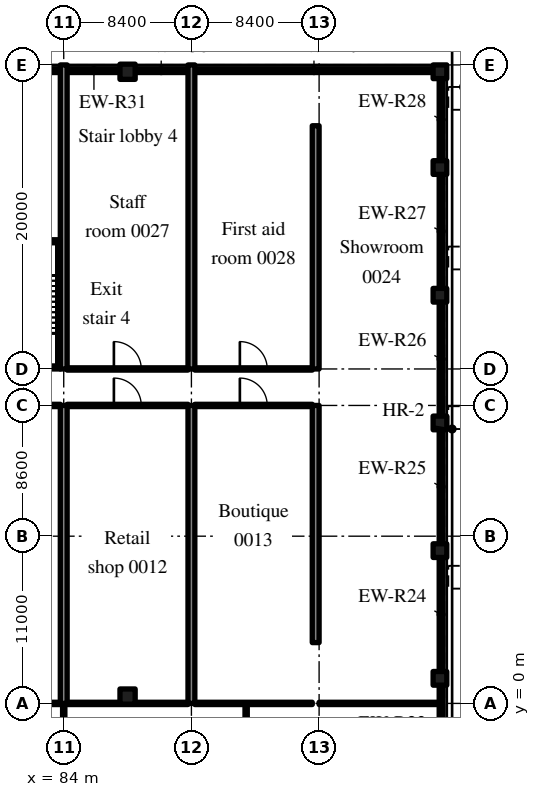
"""IFC4 building model, lengths in metres.
Left out: names, types, materials, properties, quantities, classifications, styles, units other than length and angle.
Written with IfcOpenShell. Run it as: python <this file> out.ifc"""

import sys

from ifc_helpers import new_model, si_unit, direction, frame, frame_2d, origin, origin_2d, place, context, subcontext, project, spatial, rectangle, extrude, source, transform, mapped, element, fill, save


model = new_model("IFC4")
c1 = context("Model", 3, precision=1e-05, world=origin(), true_north=direction((0.0, 1.0)))
c2 = subcontext(c1, "Body", "Model", "MODEL_VIEW")
j1 = project(units=[si_unit("LENGTHUNIT", "METRE"), si_unit("PLANEANGLEUNIT", "RADIAN")], contexts=[c1])
p1 = place(None, origin())
s1 = spatial("IfcSite", under=j1, at=p1, CompositionType="ELEMENT")
p2 = place(p1, origin())
s2 = spatial("IfcBuilding", under=s1, at=p2, CompositionType="ELEMENT")
p3 = place(p2, origin())
s3 = spatial("IfcBuildingStorey", under=s2, at=p3, CompositionType="ELEMENT", Elevation=0.0)
m1 = source(origin(), c2, "Body", "SweptSolid", [
    extrude(rectangle(XDim=19.6, YDim=0.45, at=frame_2d((9.8, 0.0))), origin(), (0.0, 0.0, 1.0), 5.72),
])
p4 = place(p3, frame((84.0, 0.0, 0.0), z_axis=(0.0, 0.0, 1.0), x_axis=(0.0, 1.0, 0.0)))
e1 = element("IfcWall", 1, at=p4, inside=s3, PredefinedType="SHEAR", context=c2, shape_type="MappedRepresentation", body=[
    mapped(m1, transform((0.0, 0.0, 0.0), scale=1.0)),
])
m2 = source(origin(), c2, "Body", "SweptSolid", [
    extrude(rectangle(XDim=20.0, YDim=0.45, at=frame_2d((10.0, 0.0))), origin(), (0.0, 0.0, 1.0), 5.72),
])
p5 = place(p3, frame((84.0, 22.0, 0.0), z_axis=(0.0, 0.0, 1.0), x_axis=(0.0, 1.0, 0.0)))
e2 = element("IfcWall", 2, at=p5, inside=s3, PredefinedType="SHEAR", context=c2, shape_type="MappedRepresentation", body=[
    mapped(m2, transform((0.0, 0.0, 0.0), scale=1.0)),
])
p6 = place(p3, frame((92.4, 0.0, 0.0), z_axis=(0.0, 0.0, 1.0), x_axis=(0.0, 1.0, 0.0)))
e3 = element("IfcWall", 3, at=p6, inside=s3, PredefinedType="SHEAR", context=c2, shape_type="MappedRepresentation", body=[
    mapped(m1, transform((0.0, 0.0, 0.0), scale=1.0)),
])
p7 = place(p3, frame((92.4, 22.0, 0.0), z_axis=(0.0, 0.0, 1.0), x_axis=(0.0, 1.0, 0.0)))
e4 = element("IfcWall", 4, at=p7, inside=s3, PredefinedType="SHEAR", context=c2, shape_type="MappedRepresentation", body=[
    mapped(m2, transform((0.0, 0.0, 0.0), scale=1.0)),
])
m3 = source(origin(), c2, "Body", "SweptSolid", [
    extrude(rectangle(XDim=15.6, YDim=0.45, at=frame_2d((7.8, 0.0))), origin(), (0.0, 0.0, 1.0), 5.72),
])
p8 = place(p3, frame((100.575, 4.0, 0.0), z_axis=(0.0, 0.0, 1.0), x_axis=(0.0, 1.0, 0.0)))
e5 = element("IfcWall", 5, at=p8, inside=s3, PredefinedType="SHEAR", context=c2, shape_type="MappedRepresentation", body=[
    mapped(m3, transform((0.0, 0.0, 0.0), scale=1.0)),
])
m4 = source(origin(), c2, "Body", "SweptSolid", [
    extrude(rectangle(XDim=16.0, YDim=0.45, at=frame_2d((8.0, 0.0))), origin(), (0.0, 0.0, 1.0), 5.72),
])
p9 = place(p3, frame((100.575, 22.0, 0.0), z_axis=(0.0, 0.0, 1.0), x_axis=(0.0, 1.0, 0.0)))
e6 = element("IfcWall", 6, at=p9, inside=s3, PredefinedType="SHEAR", context=c2, shape_type="MappedRepresentation", body=[
    mapped(m4, transform((0.0, 0.0, 0.0), scale=1.0)),
])
m5 = source(origin(), c2, "Body", "SweptSolid", [
    extrude(rectangle(XDim=1.0, YDim=1.0, at=origin_2d()), origin(), (0.0, 0.0, 1.0), 5.72),
])
for number, where, z_axis, x_axis in (
    (7, (88.2, 0.45, 0.0), (0.0, 0.0, 1.0), (1.0, 0.0, 0.0)),
    (8, (88.2, 41.55, 0.0), (0.0, 0.0, 1.0), (1.0, 0.0, 0.0)),
):
    element("IfcColumn", number, at=place(p3, frame(where, z_axis=z_axis, x_axis=x_axis)), inside=s3, PredefinedType="COLUMN", context=c2, shape_type="MappedRepresentation", body=[
        mapped(m5, transform((0.0, 0.0, 0.0), scale=1.0)),
    ])
m6 = source(origin(), c2, "Body", "SweptSolid", [
    extrude(rectangle(XDim=0.9, YDim=0.9, at=origin_2d()), origin(), (0.0, 0.0, 1.0), 5.72),
])
for number, where, z_axis, x_axis in (
    (9, (108.75, 1.65, 0.0), (0.0, 0.0, 1.0), (1.0, 0.0, 0.0)),
    (10, (108.75, 10.05, 0.0), (0.0, 0.0, 1.0), (1.0, 0.0, 0.0)),
    (11, (108.75, 18.45, 0.0), (0.0, 0.0, 1.0), (1.0, 0.0, 0.0)),
    (12, (108.75, 26.85, 0.0), (0.0, 0.0, 1.0), (1.0, 0.0, 0.0)),
    (13, (108.75, 35.25, 0.0), (0.0, 0.0, 1.0), (1.0, 0.0, 0.0)),
    (14, (108.75, 41.55, 0.0), (0.0, 0.0, 1.0), (1.0, 0.0, 0.0)),
):
    element("IfcColumn", number, at=place(p3, frame(where, z_axis=z_axis, x_axis=x_axis)), inside=s3, PredefinedType="COLUMN", context=c2, shape_type="MappedRepresentation", body=[
        mapped(m6, transform((0.0, 0.0, 0.0), scale=1.0)),
    ])
m7 = source(origin(), c2, "Body", "SweptSolid", [
    extrude(rectangle(XDim=7.5, YDim=0.25, at=frame_2d((3.75, 0.0))), origin(), (0.0, 0.0, 1.0), 4.72),
])
for number, where, z_axis, x_axis in (
    (15, (108.825, -6.3, 0.0), (0.0, 0.0, 1.0), (0.0, 1.0, 0.0)),
    (16, (108.825, 2.1, 0.0), (0.0, 0.0, 1.0), (0.0, 1.0, 0.0)),
    (17, (108.825, 10.5, 0.0), (0.0, 0.0, 1.0), (0.0, 1.0, 0.0)),
    (18, (108.825, 18.9, 0.0), (0.0, 0.0, 1.0), (0.0, 1.0, 0.0)),
    (19, (108.825, 27.3, 0.0), (0.0, 0.0, 1.0), (0.0, 1.0, 0.0)),
):
    element("IfcWall", number, at=place(p3, frame(where, z_axis=z_axis, x_axis=x_axis)), inside=s3, PredefinedType="SOLIDWALL", context=c2, shape_type="MappedRepresentation", body=[
        mapped(m7, transform((0.0, 0.0, 0.0), scale=1.0)),
    ])
m8 = source(origin(), c2, "Body", "SweptSolid", [
    extrude(rectangle(XDim=5.4, YDim=0.25, at=frame_2d((2.7, 0.0))), origin(), (0.0, 0.0, 1.0), 4.72),
])
p10 = place(p3, frame((108.825, 35.7, 0.0), z_axis=(0.0, 0.0, 1.0), x_axis=(0.0, 1.0, 0.0)))
e20 = element("IfcWall", 20, at=p10, inside=s3, PredefinedType="SOLIDWALL", context=c2, shape_type="MappedRepresentation", body=[
    mapped(m8, transform((0.0, 0.0, 0.0), scale=1.0)),
])
m9 = source(origin(), c2, "Body", "SweptSolid", [
    extrude(rectangle(XDim=15.675, YDim=0.25, at=frame_2d((7.837, 0.0))), origin(), (0.0, 0.0, 1.0), 4.97),
])
p11 = place(p3, frame((108.3, 41.625, 0.0), z_axis=(0.0, 0.0, 1.0), x_axis=(-1.0, 0.0, 0.0)))
e21 = element("IfcWall", 21, at=p11, inside=s3, PredefinedType="SOLIDWALL", context=c2, shape_type="MappedRepresentation", body=[
    mapped(m9, transform((0.0, 0.0, 0.0), scale=1.0)),
])
m10 = source(origin(), c2, "Body", "SweptSolid", [
    extrude(rectangle(XDim=1.5, YDim=1.5, at=frame_2d((0.75, 0.75))), frame((0.0, 0.135, 0.0), z_axis=(0.0, -1.0, 0.0), x_axis=(1.0, 0.0, 0.0)), (0.0, 0.0, 1.0), 0.27),
])
p12 = place(p11, frame((1.209, 0.0, 0.9)))
e22 = element("IfcOpeningElement", 22, at=p12, cuts=e21, PredefinedType="OPENING", context=c2, shape_type="MappedRepresentation", body=[
    mapped(m10, transform((0.0, 0.0, 0.0), scale=1.0)),
])
p13 = place(p11, frame((5.128, 0.0, 0.9)))
e23 = element("IfcOpeningElement", 23, at=p13, cuts=e21, PredefinedType="OPENING", context=c2, shape_type="MappedRepresentation", body=[
    mapped(m10, transform((0.0, 0.0, 0.0), scale=1.0)),
])
p14 = place(p11, frame((9.047, 0.0, 0.9)))
e24 = element("IfcOpeningElement", 24, at=p14, cuts=e21, PredefinedType="OPENING", context=c2, shape_type="MappedRepresentation", body=[
    mapped(m10, transform((0.0, 0.0, 0.0), scale=1.0)),
])
p15 = place(p11, frame((12.966, 0.0, 0.9)))
e25 = element("IfcOpeningElement", 25, at=p15, cuts=e21, PredefinedType="OPENING", context=c2, shape_type="MappedRepresentation", body=[
    mapped(m10, transform((0.0, 0.0, 0.0), scale=1.0)),
])
m11 = source(origin(), c2, "Body", "SweptSolid", [
    extrude(rectangle(XDim=3.525, YDim=0.25, at=frame_2d((1.763, 0.0))), origin(), (0.0, 0.0, 1.0), 4.97),
])
p16 = place(p3, frame((92.175, 41.625, 0.0), z_axis=(0.0, 0.0, 1.0), x_axis=(-1.0, 0.0, 0.0)))
e26 = element("IfcWall", 26, at=p16, inside=s3, PredefinedType="SOLIDWALL", context=c2, shape_type="MappedRepresentation", body=[
    mapped(m11, transform((0.0, 0.0, 0.0), scale=1.0)),
])
p17 = place(p16, frame((1.012, 0.0, 0.9)))
e27 = element("IfcOpeningElement", 27, at=p17, cuts=e26, PredefinedType="OPENING", context=c2, shape_type="MappedRepresentation", body=[
    mapped(m10, transform((0.0, 0.0, 0.0), scale=1.0)),
])
m12 = source(origin(), c2, "Body", "SweptSolid", [
    extrude(rectangle(XDim=3.525, YDim=0.25, at=frame_2d((1.762, 0.0))), origin(), (0.0, 0.0, 1.0), 4.97),
])
p18 = place(p3, frame((87.75, 41.625, 0.0), z_axis=(0.0, 0.0, 1.0), x_axis=(-1.0, 0.0, 0.0)))
e28 = element("IfcWall", 28, at=p18, inside=s3, PredefinedType="SOLIDWALL", context=c2, shape_type="MappedRepresentation", body=[
    mapped(m12, transform((0.0, 0.0, 0.0), scale=1.0)),
])
p19 = place(p18, frame((1.012, 0.0, 0.9)))
e29 = element("IfcOpeningElement", 29, at=p19, cuts=e28, PredefinedType="OPENING", context=c2, shape_type="MappedRepresentation", body=[
    mapped(m10, transform((0.0, 0.0, 0.0), scale=1.0)),
])
m13 = source(origin(), c2, "Body", "SweptSolid", [
    extrude(rectangle(XDim=1.513, YDim=0.25, at=frame_2d((0.756, 0.0))), origin(), (0.0, 0.0, 1.0), 4.97),
])
p20 = place(p3, frame((83.775, 41.625, 0.0), z_axis=(0.0, 0.0, 1.0), x_axis=(-1.0, 0.0, 0.0)))
e30 = element("IfcWall", 30, at=p20, inside=s3, PredefinedType="SOLIDWALL", context=c2, shape_type="MappedRepresentation", body=[
    mapped(m13, transform((0.0, 0.0, 0.0), scale=1.0)),
])
m14 = source(origin(), c2, "Body", "SweptSolid", [
    extrude(rectangle(XDim=8.175, YDim=0.2, at=frame_2d((4.087, 0.0))), origin(), (0.0, 0.0, 1.0), 5.72),
])
p21 = place(p3, frame((83.775, 22.1, 0.0), z_axis=(0.0, 0.0, 1.0), x_axis=(-1.0, 0.0, 0.0)))
e31 = element("IfcWall", 31, at=p21, inside=s3, PredefinedType="SOLIDWALL", context=c2, shape_type="MappedRepresentation", body=[
    mapped(m14, transform((0.0, 0.0, 0.0), scale=1.0)),
])
m15 = source(origin(), c2, "Body", "SweptSolid", [
    extrude(rectangle(XDim=1.2, YDim=2.1, at=frame_2d((0.6, 1.05))), frame((0.0, 0.11, 0.0), z_axis=(0.0, -1.0, 0.0), x_axis=(1.0, 0.0, 0.0)), (0.0, 0.0, 1.0), 0.22),
])
p22 = place(p21, frame((5.975, 0.0, 0.0)))
e32 = element("IfcOpeningElement", 32, at=p22, cuts=e31, PredefinedType="OPENING", context=c2, shape_type="MappedRepresentation", body=[
    mapped(m15, transform((0.0, 0.0, 0.0), scale=1.0)),
])
p23 = place(p3, frame((83.775, 30.4, 0.0), z_axis=(0.0, 0.0, 1.0), x_axis=(-1.0, 0.0, 0.0)))
e33 = element("IfcWall", 33, at=p23, inside=s3, PredefinedType="SOLIDWALL", context=c2, shape_type="MappedRepresentation", body=[
    mapped(m14, transform((0.0, 0.0, 0.0), scale=1.0)),
])
m16 = source(origin(), c2, "Body", "SweptSolid", [
    extrude(rectangle(XDim=1.0, YDim=2.1, at=frame_2d((0.5, 1.05))), frame((0.0, 0.11, 0.0), z_axis=(0.0, -1.0, 0.0), x_axis=(1.0, 0.0, 0.0)), (0.0, 0.0, 1.0), 0.22),
])
p24 = place(p23, frame((6.075, 0.0, 0.0)))
e34 = element("IfcOpeningElement", 34, at=p24, cuts=e33, PredefinedType="OPENING", context=c2, shape_type="MappedRepresentation", body=[
    mapped(m16, transform((0.0, 0.0, 0.0), scale=1.0)),
])
m17 = source(origin(), c2, "Body", "SweptSolid", [
    extrude(rectangle(XDim=8.1, YDim=0.175, at=frame_2d((4.05, 0.0))), origin(), (0.0, 0.0, 1.0), 5.72),
])
p25 = place(p3, frame((83.688, 22.2, 0.0), z_axis=(0.0, 0.0, 1.0), x_axis=(0.0, 1.0, 0.0)))
e35 = element("IfcWall", 35, at=p25, inside=s3, PredefinedType="SOLIDWALL", context=c2, shape_type="MappedRepresentation", body=[
    mapped(m17, transform((0.0, 0.0, 0.0), scale=1.0)),
])
m18 = source(origin(), c2, "Body", "SweptSolid", [
    extrude(rectangle(XDim=7.95, YDim=0.15, at=frame_2d((3.975, 0.0))), origin(), (0.0, 0.0, 1.0), 5.02),
])
p26 = place(p3, frame((75.825, 19.6, 0.0), z_axis=(0.0, 0.0, 1.0), x_axis=(1.0, 0.0, 0.0)))
e36 = element("IfcWall", 36, at=p26, inside=s3, PredefinedType="PARTITIONING", context=c2, shape_type="MappedRepresentation", body=[
    mapped(m18, transform((0.0, 0.0, 0.0), scale=1.0)),
])
m19 = source(origin(), c2, "Body", "SweptSolid", [
    extrude(rectangle(XDim=1.8, YDim=2.1, at=frame_2d((0.9, 1.05))), frame((0.0, 0.085, 0.0), z_axis=(0.0, -1.0, 0.0), x_axis=(1.0, 0.0, 0.0)), (0.0, 0.0, 1.0), 0.17),
])
p27 = place(p26, frame((3.075, 0.0, 0.0)))
e37 = element("IfcOpeningElement", 37, at=p27, cuts=e36, PredefinedType="OPENING", context=c2, shape_type="MappedRepresentation", body=[
    mapped(m19, transform((0.0, 0.0, 0.0), scale=1.0)),
])
m20 = source(origin(), c2, "Body", "SweptSolid", [
    extrude(rectangle(XDim=7.95, YDim=0.15, at=frame_2d((3.975, 0.0))), origin(), (0.0, 0.0, 1.0), 5.72),
])
p28 = place(p3, frame((75.825, 0.0, 0.0), z_axis=(0.0, 0.0, 1.0), x_axis=(1.0, 0.0, 0.0)))
e38 = element("IfcWall", 38, at=p28, inside=s3, PredefinedType="PARTITIONING", context=c2, shape_type="MappedRepresentation", body=[
    mapped(m20, transform((0.0, 0.0, 0.0), scale=1.0)),
])
p29 = place(p3, frame((84.225, 19.6, 0.0), z_axis=(0.0, 0.0, 1.0), x_axis=(1.0, 0.0, 0.0)))
e39 = element("IfcWall", 39, at=p29, inside=s3, PredefinedType="PARTITIONING", context=c2, shape_type="MappedRepresentation", body=[
    mapped(m18, transform((0.0, 0.0, 0.0), scale=1.0)),
])
p30 = place(p29, frame((3.075, 0.0, 0.0)))
e40 = element("IfcOpeningElement", 40, at=p30, cuts=e39, PredefinedType="OPENING", context=c2, shape_type="MappedRepresentation", body=[
    mapped(m19, transform((0.0, 0.0, 0.0), scale=1.0)),
])
p31 = place(p3, frame((84.225, 0.0, 0.0), z_axis=(0.0, 0.0, 1.0), x_axis=(1.0, 0.0, 0.0)))
e41 = element("IfcWall", 41, at=p31, inside=s3, PredefinedType="PARTITIONING", context=c2, shape_type="MappedRepresentation", body=[
    mapped(m20, transform((0.0, 0.0, 0.0), scale=1.0)),
])
m21 = source(origin(), c2, "Body", "SweptSolid", [
    extrude(rectangle(XDim=7.725, YDim=0.15, at=frame_2d((3.863, 0.0))), origin(), (0.0, 0.0, 1.0), 5.02),
])
p32 = place(p3, frame((92.625, 19.6, 0.0), z_axis=(0.0, 0.0, 1.0), x_axis=(1.0, 0.0, 0.0)))
e42 = element("IfcWall", 42, at=p32, inside=s3, PredefinedType="PARTITIONING", context=c2, shape_type="MappedRepresentation", body=[
    mapped(m21, transform((0.0, 0.0, 0.0), scale=1.0)),
])
p33 = place(p32, frame((2.962, 0.0, 0.0)))
e43 = element("IfcOpeningElement", 43, at=p33, cuts=e42, PredefinedType="OPENING", context=c2, shape_type="MappedRepresentation", body=[
    mapped(m19, transform((0.0, 0.0, 0.0), scale=1.0)),
])
m22 = source(origin(), c2, "Body", "SweptSolid", [
    extrude(rectangle(XDim=7.725, YDim=0.15, at=frame_2d((3.863, 0.0))), origin(), (0.0, 0.0, 1.0), 5.72),
])
p34 = place(p3, frame((92.625, 0.0, 0.0), z_axis=(0.0, 0.0, 1.0), x_axis=(1.0, 0.0, 0.0)))
e44 = element("IfcWall", 44, at=p34, inside=s3, PredefinedType="PARTITIONING", context=c2, shape_type="MappedRepresentation", body=[
    mapped(m22, transform((0.0, 0.0, 0.0), scale=1.0)),
])
m23 = source(origin(), c2, "Body", "SweptSolid", [
    extrude(rectangle(XDim=20.845, YDim=0.15, at=frame_2d((10.422, 0.0))), origin(), (0.0, 0.0, 1.0), 4.12),
])
p35 = place(p3, frame((84.0, -20.92, 0.0), z_axis=(0.0, 0.0, 1.0), x_axis=(0.0, 1.0, 0.0)))
e45 = element("IfcWall", 45, at=p35, inside=s3, PredefinedType="PARTITIONING", context=c2, shape_type="MappedRepresentation", body=[
    mapped(m23, transform((0.0, 0.0, 0.0), scale=1.0)),
])
p36 = place(p35, frame((10.27, 0.0, 0.0)))
e46 = element("IfcOpeningElement", 46, at=p36, cuts=e45, PredefinedType="OPENING", context=c2, shape_type="MappedRepresentation", body=[
    mapped(m19, transform((0.0, 0.0, 0.0), scale=1.0)),
])
m24 = source(origin(), c2, "Body", "SweptSolid", [
    extrude(rectangle(XDim=23.425, YDim=0.15, at=frame_2d((11.712, 0.0))), origin(), (0.0, 0.0, 1.0), 5.72),
])
p37 = place(p3, frame((96.0, -23.5, 0.0), z_axis=(0.0, 0.0, 1.0), x_axis=(0.0, 1.0, 0.0)))
e47 = element("IfcWall", 47, at=p37, inside=s3, PredefinedType="PARTITIONING", context=c2, shape_type="MappedRepresentation", body=[
    mapped(m24, transform((0.0, 0.0, 0.0), scale=1.0)),
])
p38 = place(p37, frame((10.6, 0.0, 0.0)))
e48 = element("IfcOpeningElement", 48, at=p38, cuts=e47, PredefinedType="OPENING", context=c2, shape_type="MappedRepresentation", body=[
    mapped(m19, transform((0.0, 0.0, 0.0), scale=1.0)),
])
m25 = source(origin(), c2, "Body", "SweptSolid", [
    extrude(rectangle(XDim=7.9, YDim=0.15, at=frame_2d((3.95, 0.0))), origin(), (0.0, 0.0, 1.0), 5.72),
])
p39 = place(p3, frame((100.8, 0.0, 0.0), z_axis=(0.0, 0.0, 1.0), x_axis=(1.0, 0.0, 0.0)))
e49 = element("IfcWall", 49, at=p39, inside=s3, PredefinedType="PARTITIONING", context=c2, shape_type="MappedRepresentation", body=[
    mapped(m25, transform((0.0, 0.0, 0.0), scale=1.0)),
])
p40 = place(p3, frame((84.225, 22.0, 0.0), z_axis=(0.0, 0.0, 1.0), x_axis=(1.0, 0.0, 0.0)))
e50 = element("IfcWall", 50, at=p40, inside=s3, PredefinedType="PARTITIONING", context=c2, shape_type="MappedRepresentation", body=[
    mapped(m18, transform((0.0, 0.0, 0.0), scale=1.0)),
])
p41 = place(p40, frame((3.075, 0.0, 0.0)))
e51 = element("IfcOpeningElement", 51, at=p41, cuts=e50, PredefinedType="OPENING", context=c2, shape_type="MappedRepresentation", body=[
    mapped(m19, transform((0.0, 0.0, 0.0), scale=1.0)),
])
p42 = place(p3, frame((92.625, 22.0, 0.0), z_axis=(0.0, 0.0, 1.0), x_axis=(1.0, 0.0, 0.0)))
e52 = element("IfcWall", 52, at=p42, inside=s3, PredefinedType="PARTITIONING", context=c2, shape_type="MappedRepresentation", body=[
    mapped(m21, transform((0.0, 0.0, 0.0), scale=1.0)),
])
p43 = place(p42, frame((2.962, 0.0, 0.0)))
e53 = element("IfcOpeningElement", 53, at=p43, cuts=e52, PredefinedType="OPENING", context=c2, shape_type="MappedRepresentation", body=[
    mapped(m19, transform((0.0, 0.0, 0.0), scale=1.0)),
])
m26 = source(origin(), c2, "Body", "SweptSolid", [
    extrude(rectangle(XDim=1.5, YDim=1.5, at=frame_2d((0.75, 0.75))), frame((0.0, 0.03, 0.0), z_axis=(0.0, -1.0, 0.0), x_axis=(1.0, 0.0, 0.0)), (0.0, 0.0, 1.0), 0.06),
])
p44 = place(p12, origin())
e54 = element("IfcWindow", 54, at=p44, inside=s3, PartitioningType="SINGLE_PANEL", PredefinedType="WINDOW", context=c2, shape_type="MappedRepresentation", body=[
    mapped(m26, transform((0.0, 0.0, 0.0), scale=1.0)),
])
fill(e22, e54)
p45 = place(p13, origin())
e55 = element("IfcWindow", 55, at=p45, inside=s3, PartitioningType="SINGLE_PANEL", PredefinedType="WINDOW", context=c2, shape_type="MappedRepresentation", body=[
    mapped(m26, transform((0.0, 0.0, 0.0), scale=1.0)),
])
fill(e23, e55)
p46 = place(p14, origin())
e56 = element("IfcWindow", 56, at=p46, inside=s3, PartitioningType="SINGLE_PANEL", PredefinedType="WINDOW", context=c2, shape_type="MappedRepresentation", body=[
    mapped(m26, transform((0.0, 0.0, 0.0), scale=1.0)),
])
fill(e24, e56)
p47 = place(p15, origin())
e57 = element("IfcWindow", 57, at=p47, inside=s3, PartitioningType="SINGLE_PANEL", PredefinedType="WINDOW", context=c2, shape_type="MappedRepresentation", body=[
    mapped(m26, transform((0.0, 0.0, 0.0), scale=1.0)),
])
fill(e25, e57)
p48 = place(p17, origin())
e58 = element("IfcWindow", 58, at=p48, inside=s3, PartitioningType="SINGLE_PANEL", PredefinedType="WINDOW", context=c2, shape_type="MappedRepresentation", body=[
    mapped(m26, transform((0.0, 0.0, 0.0), scale=1.0)),
])
fill(e27, e58)
p49 = place(p19, origin())
e59 = element("IfcWindow", 59, at=p49, inside=s3, PartitioningType="SINGLE_PANEL", PredefinedType="WINDOW", context=c2, shape_type="MappedRepresentation", body=[
    mapped(m26, transform((0.0, 0.0, 0.0), scale=1.0)),
])
fill(e29, e59)
m27 = source(origin(), c2, "Body", "SweptSolid", [
    extrude(rectangle(XDim=1.8, YDim=2.1, at=frame_2d((0.9, 1.05))), frame((0.0, 0.025, 0.0), z_axis=(0.0, -1.0, 0.0), x_axis=(1.0, 0.0, 0.0)), (0.0, 0.0, 1.0), 0.05),
])
p50 = place(p30, origin())
e60 = element("IfcDoor", 60, at=p50, inside=s3, OperationType="DOUBLE_DOOR_SINGLE_SWING", PredefinedType="DOOR", context=c2, shape_type="MappedRepresentation", body=[
    mapped(m27, transform((0.0, 0.0, 0.0), scale=1.0)),
])
fill(e40, e60)
p51 = place(p33, origin())
e61 = element("IfcDoor", 61, at=p51, inside=s3, OperationType="DOUBLE_DOOR_SINGLE_SWING", PredefinedType="DOOR", context=c2, shape_type="MappedRepresentation", body=[
    mapped(m27, transform((0.0, 0.0, 0.0), scale=1.0)),
])
fill(e43, e61)
p52 = place(p41, origin())
e62 = element("IfcDoor", 62, at=p52, inside=s3, OperationType="DOUBLE_DOOR_SINGLE_SWING", PredefinedType="DOOR", context=c2, shape_type="MappedRepresentation", body=[
    mapped(m27, transform((0.0, 0.0, 0.0), scale=1.0)),
])
fill(e51, e62)
p53 = place(p43, origin())
e63 = element("IfcDoor", 63, at=p53, inside=s3, OperationType="DOUBLE_DOOR_SINGLE_SWING", PredefinedType="DOOR", context=c2, shape_type="MappedRepresentation", body=[
    mapped(m27, transform((0.0, 0.0, 0.0), scale=1.0)),
])
fill(e53, e63)
save(model, sys.argv[1])
